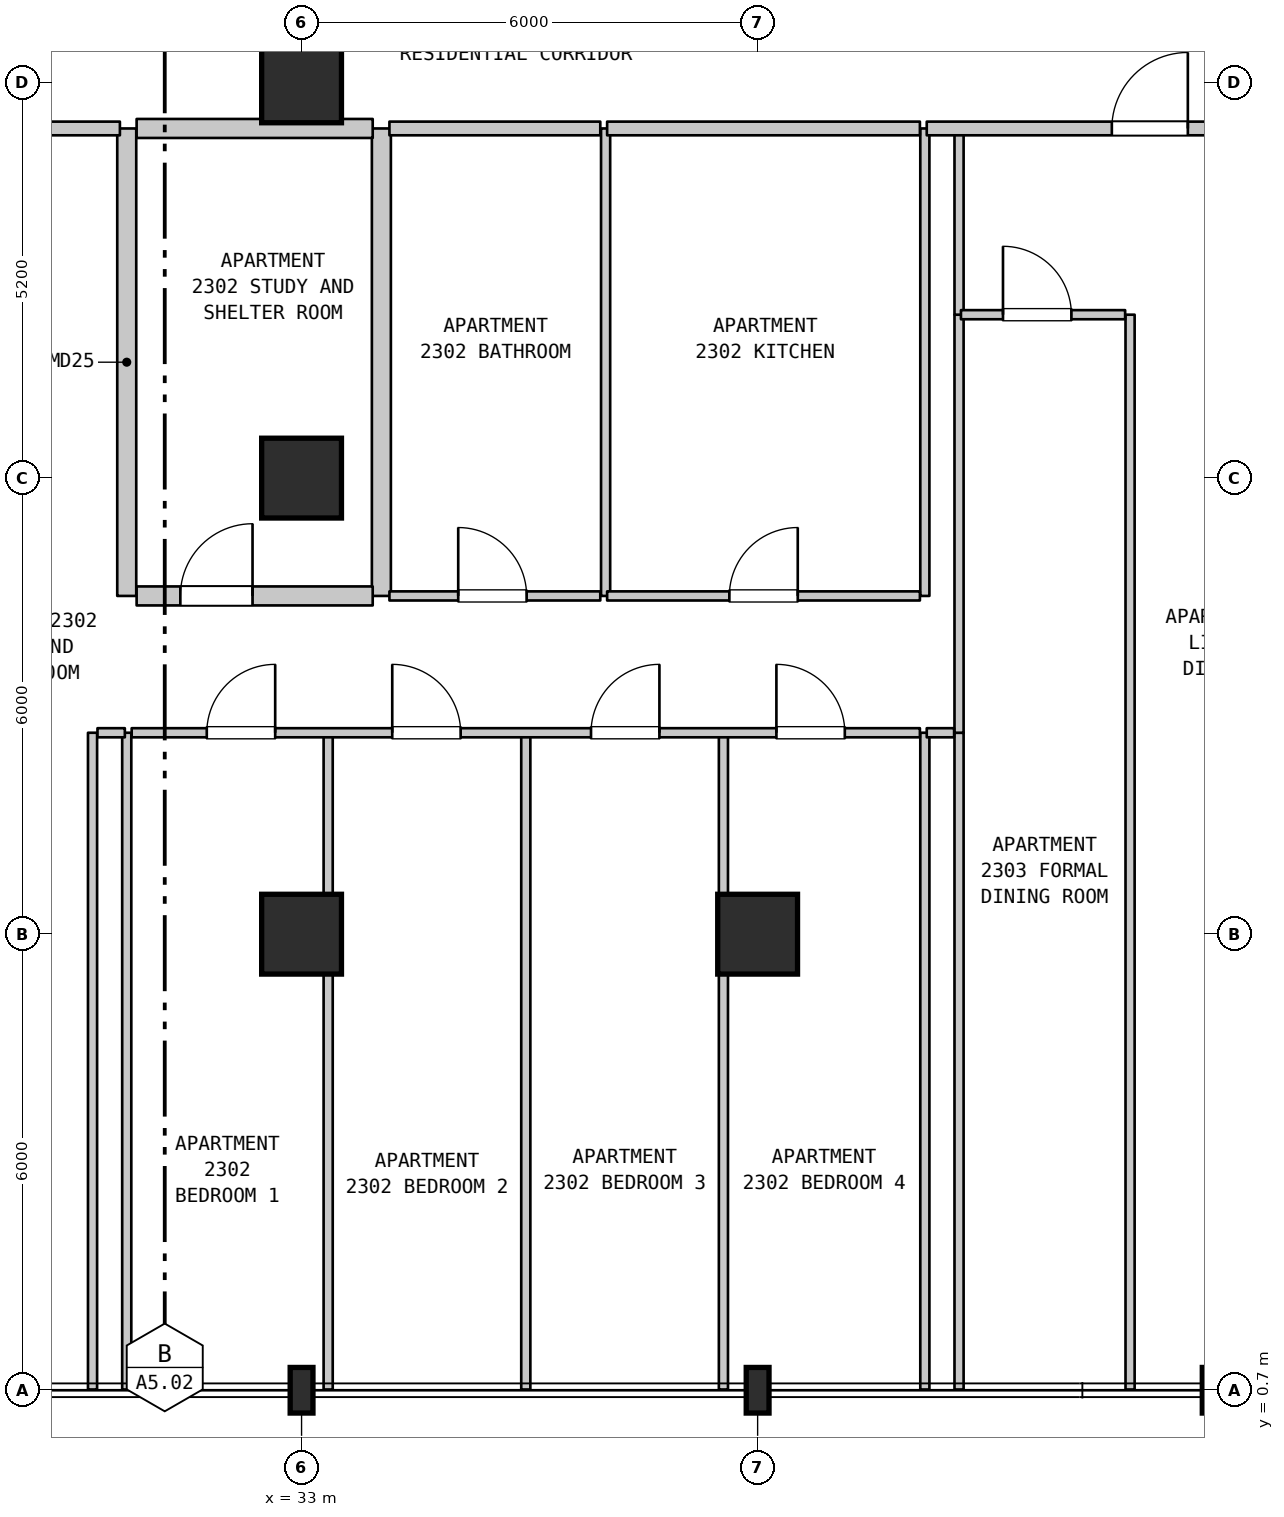
"""IFC4 building model, lengths in metres.
Left out: names, types, materials, properties, quantities, classifications, styles, units other than length and angle.
Written with IfcOpenShell. Run it as: python <this file> out.ifc"""

import sys

from ifc_helpers import new_model, si_unit, direction, frame, frame_2d, origin, origin_2d, place, context, subcontext, project, spatial, rectangle, i_section, extrude, element, fill, save


model = new_model("IFC4")
c1 = context("Model", 3, precision=1e-05, world=origin(), true_north=direction((0.0, 1.0)))
c2 = subcontext(c1, "Body", "Model", "MODEL_VIEW")
j1 = project(units=[si_unit("LENGTHUNIT", "METRE"), si_unit("PLANEANGLEUNIT", "RADIAN")], contexts=[c1])
p1 = place(None, origin())
s1 = spatial("IfcSite", under=j1, at=p1, CompositionType="ELEMENT")
p2 = place(p1, origin())
s2 = spatial("IfcBuilding", under=s1, at=p2, CompositionType="ELEMENT")
p3 = place(p2, frame((0.0, 0.0, 98.3)))
s3 = spatial("IfcBuildingStorey", under=s2, at=p3, CompositionType="ELEMENT", Elevation=98.3)
p4 = place(p3, frame((33.0, 0.7, 0.0), z_axis=(0.0, 0.0, 1.0), x_axis=(1.0, 0.0, 0.0)))
e1 = element("IfcColumn", 1, at=p4, inside=s3, PredefinedType="COLUMN", context=c2, shape_type="SweptSolid", body=[
    extrude(i_section(OverallWidth=0.3, OverallDepth=0.6, WebThickness=0.015, FlangeThickness=0.03, FilletRadius=0.027, at=origin_2d()), origin(), (0.0, 0.0, 1.0), 3.7),
])
for number, where, z_axis, x_axis in (
    (2, (33.0, 6.7, 0.0), (0.0, 0.0, 1.0), (1.0, 0.0, 0.0)),
    (3, (33.0, 12.7, 0.0), (0.0, 0.0, 1.0), (1.0, 0.0, 0.0)),
    (4, (33.0, 17.9, 0.0), (0.0, 0.0, 1.0), (1.0, 0.0, 0.0)),
):
    element("IfcColumn", number, at=place(p3, frame(where, z_axis=z_axis, x_axis=x_axis)), inside=s3, PredefinedType="COLUMN", context=c2, shape_type="SweptSolid", body=[
        extrude(rectangle(XDim=1.05, YDim=1.05, at=origin_2d()), origin(), (0.0, 0.0, 1.0), 3.7),
    ])
p5 = place(p3, frame((39.0, 0.7, 0.0), z_axis=(0.0, 0.0, 1.0), x_axis=(1.0, 0.0, 0.0)))
e5 = element("IfcColumn", 5, at=p5, inside=s3, PredefinedType="COLUMN", context=c2, shape_type="SweptSolid", body=[
    extrude(i_section(OverallWidth=0.3, OverallDepth=0.6, WebThickness=0.015, FlangeThickness=0.03, FilletRadius=0.027, at=origin_2d()), origin(), (0.0, 0.0, 1.0), 3.7),
])
p6 = place(p3, frame((39.0, 6.7, 0.0), z_axis=(0.0, 0.0, 1.0), x_axis=(1.0, 0.0, 0.0)))
e6 = element("IfcColumn", 6, at=p6, inside=s3, PredefinedType="COLUMN", context=c2, shape_type="SweptSolid", body=[
    extrude(rectangle(XDim=1.05, YDim=1.05, at=origin_2d()), origin(), (0.0, 0.0, 1.0), 3.7),
])
p7 = place(p3, frame((45.0, 0.7, 0.0), z_axis=(0.0, 0.0, 1.0), x_axis=(1.0, 0.0, 0.0)))
e7 = element("IfcColumn", 7, at=p7, inside=s3, PredefinedType="COLUMN", context=c2, shape_type="SweptSolid", body=[
    extrude(i_section(OverallWidth=0.3, OverallDepth=0.6, WebThickness=0.015, FlangeThickness=0.03, FilletRadius=0.027, at=origin_2d()), origin(), (0.0, 0.0, 1.0), 3.7),
])
for number, where, z_axis, x_axis in (
    (8, (30.25, 0.71, 0.0), (0.0, 0.0, 1.0), (0.0, 1.0, 0.0)),
    (9, (30.7, 0.71, 0.0), (0.0, 0.0, 1.0), (0.0, 1.0, 0.0)),
):
    element("IfcWall", number, at=place(p3, frame(where, z_axis=z_axis, x_axis=x_axis)), inside=s3, PredefinedType="PARTITIONING", context=c2, shape_type="SweptSolid", body=[
        extrude(rectangle(XDim=8.64, YDim=0.12, at=frame_2d((4.32, 0.0))), origin(), (0.0, 0.0, 1.0), 3.385),
    ])
p8 = place(p3, frame((30.7, 11.15, 0.0), z_axis=(0.0, 0.0, 1.0), x_axis=(0.0, 1.0, 0.0)))
e10 = element("IfcWall", 10, at=p8, inside=s3, PredefinedType="STANDARD", context=c2, shape_type="SweptSolid", body=[
    extrude(rectangle(XDim=6.15, YDim=0.25, at=frame_2d((3.075, 0.0))), origin(), (0.0, 0.0, 1.0), 3.385),
])
p9 = place(p3, frame((33.35, 0.71, 0.0), z_axis=(0.0, 0.0, 1.0), x_axis=(0.0, 1.0, 0.0)))
e11 = element("IfcWall", 11, at=p9, inside=s3, PredefinedType="PARTITIONING", context=c2, shape_type="SweptSolid", body=[
    extrude(rectangle(XDim=8.64, YDim=0.12, at=frame_2d((4.32, 0.0))), origin(), (0.0, 0.0, 1.0), 3.385),
])
p10 = place(p3, frame((34.05, 11.15, 0.0), z_axis=(0.0, 0.0, 1.0), x_axis=(0.0, 1.0, 0.0)))
e12 = element("IfcWall", 12, at=p10, inside=s3, PredefinedType="STANDARD", context=c2, shape_type="SweptSolid", body=[
    extrude(rectangle(XDim=6.15, YDim=0.25, at=frame_2d((3.075, 0.0))), origin(), (0.0, 0.0, 1.0), 3.385),
])
p11 = place(p3, frame((35.95, 0.71, 0.0), z_axis=(0.0, 0.0, 1.0), x_axis=(0.0, 1.0, 0.0)))
e13 = element("IfcWall", 13, at=p11, inside=s3, PredefinedType="PARTITIONING", context=c2, shape_type="SweptSolid", body=[
    extrude(rectangle(XDim=8.64, YDim=0.12, at=frame_2d((4.32, 0.0))), origin(), (0.0, 0.0, 1.0), 3.385),
])
p12 = place(p3, frame((37.0, 11.15, 0.0), z_axis=(0.0, 0.0, 1.0), x_axis=(0.0, 1.0, 0.0)))
e14 = element("IfcWall", 14, at=p12, inside=s3, PredefinedType="PARTITIONING", context=c2, shape_type="SweptSolid", body=[
    extrude(rectangle(XDim=6.15, YDim=0.12, at=frame_2d((3.075, 0.0))), origin(), (0.0, 0.0, 1.0), 3.385),
])
for number, where, z_axis, x_axis in (
    (15, (38.55, 0.71, 0.0), (0.0, 0.0, 1.0), (0.0, 1.0, 0.0)),
    (16, (41.2, 0.71, 0.0), (0.0, 0.0, 1.0), (0.0, 1.0, 0.0)),
):
    element("IfcWall", number, at=place(p3, frame(where, z_axis=z_axis, x_axis=x_axis)), inside=s3, PredefinedType="PARTITIONING", context=c2, shape_type="SweptSolid", body=[
        extrude(rectangle(XDim=8.64, YDim=0.12, at=frame_2d((4.32, 0.0))), origin(), (0.0, 0.0, 1.0), 3.385),
    ])
p13 = place(p3, frame((41.2, 11.15, 0.0), z_axis=(0.0, 0.0, 1.0), x_axis=(0.0, 1.0, 0.0)))
e17 = element("IfcWall", 17, at=p13, inside=s3, PredefinedType="PARTITIONING", context=c2, shape_type="SweptSolid", body=[
    extrude(rectangle(XDim=6.15, YDim=0.12, at=frame_2d((3.075, 0.0))), origin(), (0.0, 0.0, 1.0), 3.385),
])
p14 = place(p3, frame((41.65, 0.71, 0.0), z_axis=(0.0, 0.0, 1.0), x_axis=(0.0, 1.0, 0.0)))
e18 = element("IfcWall", 18, at=p14, inside=s3, PredefinedType="PARTITIONING", context=c2, shape_type="SweptSolid", body=[
    extrude(rectangle(XDim=8.64, YDim=0.12, at=frame_2d((4.32, 0.0))), origin(), (0.0, 0.0, 1.0), 3.385),
])
p15 = place(p3, frame((41.65, 9.35, 0.0), z_axis=(0.0, 0.0, 1.0), x_axis=(0.0, 1.0, 0.0)))
e19 = element("IfcWall", 19, at=p15, inside=s3, PredefinedType="PARTITIONING", context=c2, shape_type="SweptSolid", body=[
    extrude(rectangle(XDim=5.5, YDim=0.12, at=frame_2d((2.75, 0.0))), origin(), (0.0, 0.0, 1.0), 3.385),
])
p16 = place(p3, frame((41.65, 14.85, 0.0), z_axis=(0.0, 0.0, 1.0), x_axis=(0.0, 1.0, 0.0)))
e20 = element("IfcWall", 20, at=p16, inside=s3, PredefinedType="PARTITIONING", context=c2, shape_type="SweptSolid", body=[
    extrude(rectangle(XDim=2.45, YDim=0.12, at=frame_2d((1.225, 0.0))), origin(), (0.0, 0.0, 1.0), 3.385),
])
p17 = place(p3, frame((43.9, 0.71, 0.0), z_axis=(0.0, 0.0, 1.0), x_axis=(0.0, 1.0, 0.0)))
e21 = element("IfcWall", 21, at=p17, inside=s3, PredefinedType="PARTITIONING", context=c2, shape_type="SweptSolid", body=[
    extrude(rectangle(XDim=14.14, YDim=0.12, at=frame_2d((7.07, 0.0))), origin(), (0.0, 0.0, 1.0), 3.385),
])
p18 = place(p3, frame((30.315, 9.35, 0.0), z_axis=(0.0, 0.0, 1.0), x_axis=(1.0, 0.0, 0.0)))
e22 = element("IfcWall", 22, at=p18, inside=s3, PredefinedType="PARTITIONING", context=c2, shape_type="SweptSolid", body=[
    extrude(rectangle(XDim=0.36, YDim=0.12, at=frame_2d((0.18, 0.0))), origin(), (0.0, 0.0, 1.0), 3.385),
])
p19 = place(p3, frame((30.765, 9.35, 0.0), z_axis=(0.0, 0.0, 1.0), x_axis=(1.0, 0.0, 0.0)))
e23 = element("IfcWall", 23, at=p19, inside=s3, PredefinedType="PARTITIONING", context=c2, shape_type="SweptSolid", body=[
    extrude(rectangle(XDim=10.37, YDim=0.12, at=frame_2d((5.185, 0.0))), origin(), (0.0, 0.0, 1.0), 3.385),
])
p20 = place(p19, frame((0.988, 0.0, 0.0)))
e24 = element("IfcOpeningElement", 24, at=p20, cuts=e23, PredefinedType="OPENING", context=c2, shape_type="SweptSolid", body=[
    extrude(rectangle(XDim=0.9, YDim=2.15, at=frame_2d((0.45, 1.075))), frame((0.0, 0.07, 0.0), z_axis=(0.0, -1.0, 0.0), x_axis=(1.0, 0.0, 0.0)), (0.0, 0.0, 1.0), 0.14),
])
p21 = place(p19, frame((3.428, 0.0, 0.0)))
e25 = element("IfcOpeningElement", 25, at=p21, cuts=e23, PredefinedType="OPENING", context=c2, shape_type="SweptSolid", body=[
    extrude(rectangle(XDim=0.9, YDim=2.15, at=frame_2d((0.45, 1.075))), frame((0.0, 0.07, 0.0), z_axis=(0.0, -1.0, 0.0), x_axis=(1.0, 0.0, 0.0)), (0.0, 0.0, 1.0), 0.14),
])
p22 = place(p19, frame((6.043, 0.0, 0.0)))
e26 = element("IfcOpeningElement", 26, at=p22, cuts=e23, PredefinedType="OPENING", context=c2, shape_type="SweptSolid", body=[
    extrude(rectangle(XDim=0.9, YDim=2.15, at=frame_2d((0.45, 1.075))), frame((0.0, 0.07, 0.0), z_axis=(0.0, -1.0, 0.0), x_axis=(1.0, 0.0, 0.0)), (0.0, 0.0, 1.0), 0.14),
])
p23 = place(p19, frame((8.482, 0.0, 0.0)))
e27 = element("IfcOpeningElement", 27, at=p23, cuts=e23, PredefinedType="OPENING", context=c2, shape_type="SweptSolid", body=[
    extrude(rectangle(XDim=0.9, YDim=2.15, at=frame_2d((0.45, 1.075))), frame((0.0, 0.07, 0.0), z_axis=(0.0, -1.0, 0.0), x_axis=(1.0, 0.0, 0.0)), (0.0, 0.0, 1.0), 0.14),
])
p24 = place(p3, frame((41.225, 9.35, 0.0), z_axis=(0.0, 0.0, 1.0), x_axis=(1.0, 0.0, 0.0)))
e28 = element("IfcWall", 28, at=p24, inside=s3, PredefinedType="PARTITIONING", context=c2, shape_type="SweptSolid", body=[
    extrude(rectangle(XDim=0.36, YDim=0.12, at=frame_2d((0.18, 0.0))), origin(), (0.0, 0.0, 1.0), 3.385),
])
p25 = place(p3, frame((30.83, 11.15, 0.0), z_axis=(0.0, 0.0, 1.0), x_axis=(1.0, 0.0, 0.0)))
e29 = element("IfcWall", 29, at=p25, inside=s3, PredefinedType="STANDARD", context=c2, shape_type="SweptSolid", body=[
    extrude(rectangle(XDim=3.106, YDim=0.25, at=frame_2d((1.553, 0.0))), origin(), (0.0, 0.0, 1.0), 3.385),
])
p26 = place(p25, frame((0.575, 0.0, 0.0)))
e30 = element("IfcOpeningElement", 30, at=p26, cuts=e29, PredefinedType="OPENING", context=c2, shape_type="SweptSolid", body=[
    extrude(rectangle(XDim=0.95, YDim=2.15, at=frame_2d((0.475, 1.075))), frame((0.0, 0.135, 0.0), z_axis=(0.0, -1.0, 0.0), x_axis=(1.0, 0.0, 0.0)), (0.0, 0.0, 1.0), 0.27),
])
p27 = place(p3, frame((34.156, 11.15, 0.0), z_axis=(0.0, 0.0, 1.0), x_axis=(1.0, 0.0, 0.0)))
e31 = element("IfcWall", 31, at=p27, inside=s3, PredefinedType="PARTITIONING", context=c2, shape_type="SweptSolid", body=[
    extrude(rectangle(XDim=2.774, YDim=0.12, at=frame_2d((1.387, 0.0))), origin(), (0.0, 0.0, 1.0), 3.385),
])
p28 = place(p27, frame((0.905, 0.0, 0.0)))
e32 = element("IfcOpeningElement", 32, at=p28, cuts=e31, PredefinedType="OPENING", context=c2, shape_type="SweptSolid", body=[
    extrude(rectangle(XDim=0.9, YDim=2.1, at=frame_2d((0.45, 1.05))), frame((0.0, 0.07, 0.0), z_axis=(0.0, -1.0, 0.0), x_axis=(1.0, 0.0, 0.0)), (0.0, 0.0, 1.0), 0.14),
])
p29 = place(p3, frame((37.02, 11.15, 0.0), z_axis=(0.0, 0.0, 1.0), x_axis=(1.0, 0.0, 0.0)))
e33 = element("IfcWall", 33, at=p29, inside=s3, PredefinedType="PARTITIONING", context=c2, shape_type="SweptSolid", body=[
    extrude(rectangle(XDim=4.115, YDim=0.12, at=frame_2d((2.058, 0.0))), origin(), (0.0, 0.0, 1.0), 3.385),
])
p30 = place(p29, frame((1.608, 0.0, 0.0)))
e34 = element("IfcOpeningElement", 34, at=p30, cuts=e33, PredefinedType="OPENING", context=c2, shape_type="SweptSolid", body=[
    extrude(rectangle(XDim=0.9, YDim=2.15, at=frame_2d((0.45, 1.075))), frame((0.0, 0.07, 0.0), z_axis=(0.0, -1.0, 0.0), x_axis=(1.0, 0.0, 0.0)), (0.0, 0.0, 1.0), 0.14),
])
p31 = place(p3, frame((41.675, 14.85, 0.0), z_axis=(0.0, 0.0, 1.0), x_axis=(1.0, 0.0, 0.0)))
e35 = element("IfcWall", 35, at=p31, inside=s3, PredefinedType="PARTITIONING", context=c2, shape_type="SweptSolid", body=[
    extrude(rectangle(XDim=2.16, YDim=0.12, at=frame_2d((1.08, 0.0))), origin(), (0.0, 0.0, 1.0), 3.385),
])
p32 = place(p31, frame((0.553, 0.0, 0.0)))
e36 = element("IfcOpeningElement", 36, at=p32, cuts=e35, PredefinedType="OPENING", context=c2, shape_type="SweptSolid", body=[
    extrude(rectangle(XDim=0.9, YDim=2.15, at=frame_2d((0.45, 1.075))), frame((0.0, 0.07, 0.0), z_axis=(0.0, -1.0, 0.0), x_axis=(1.0, 0.0, 0.0)), (0.0, 0.0, 1.0), 0.14),
])
p33 = place(p3, frame((25.515, 17.3, 0.0), z_axis=(0.0, 0.0, 1.0), x_axis=(1.0, 0.0, 0.0)))
e37 = element("IfcWall", 37, at=p33, inside=s3, PredefinedType="STANDARD", context=c2, shape_type="SweptSolid", body=[
    extrude(rectangle(XDim=5.095, YDim=0.18, at=frame_2d((2.548, 0.0))), origin(), (0.0, 0.0, 1.0), 3.385),
])
p34 = place(p33, frame((2.08, 0.0, 0.0)))
e38 = element("IfcOpeningElement", 38, at=p34, cuts=e37, PredefinedType="OPENING", context=c2, shape_type="SweptSolid", body=[
    extrude(rectangle(XDim=1.0, YDim=2.15, at=frame_2d((0.5, 1.075))), frame((0.0, 0.1, 0.0), z_axis=(0.0, -1.0, 0.0), x_axis=(1.0, 0.0, 0.0)), (0.0, 0.0, 1.0), 0.2),
])
p35 = place(p3, frame((30.83, 17.3, 0.0), z_axis=(0.0, 0.0, 1.0), x_axis=(1.0, 0.0, 0.0)))
e39 = element("IfcWall", 39, at=p35, inside=s3, PredefinedType="STANDARD", context=c2, shape_type="SweptSolid", body=[
    extrude(rectangle(XDim=3.106, YDim=0.25, at=frame_2d((1.553, 0.0))), origin(), (0.0, 0.0, 1.0), 3.385),
])
p36 = place(p3, frame((34.156, 17.3, 0.0), z_axis=(0.0, 0.0, 1.0), x_axis=(1.0, 0.0, 0.0)))
e40 = element("IfcWall", 40, at=p36, inside=s3, PredefinedType="STANDARD", context=c2, shape_type="SweptSolid", body=[
    extrude(rectangle(XDim=2.774, YDim=0.18, at=frame_2d((1.387, 0.0))), origin(), (0.0, 0.0, 1.0), 3.385),
])
p37 = place(p3, frame((37.02, 17.3, 0.0), z_axis=(0.0, 0.0, 1.0), x_axis=(1.0, 0.0, 0.0)))
e41 = element("IfcWall", 41, at=p37, inside=s3, PredefinedType="STANDARD", context=c2, shape_type="SweptSolid", body=[
    extrude(rectangle(XDim=4.115, YDim=0.18, at=frame_2d((2.058, 0.0))), origin(), (0.0, 0.0, 1.0), 3.385),
])
p38 = place(p3, frame((41.225, 17.3, 0.0), z_axis=(0.0, 0.0, 1.0), x_axis=(1.0, 0.0, 0.0)))
e42 = element("IfcWall", 42, at=p38, inside=s3, PredefinedType="STANDARD", context=c2, shape_type="SweptSolid", body=[
    extrude(rectangle(XDim=5.545, YDim=0.18, at=frame_2d((2.772, 0.0))), origin(), (0.0, 0.0, 1.0), 3.385),
])
p39 = place(p38, frame((2.435, 0.0, 0.0)))
e43 = element("IfcOpeningElement", 43, at=p39, cuts=e42, PredefinedType="OPENING", context=c2, shape_type="SweptSolid", body=[
    extrude(rectangle(XDim=1.0, YDim=2.15, at=frame_2d((0.5, 1.075))), frame((0.0, 0.1, 0.0), z_axis=(0.0, -1.0, 0.0), x_axis=(1.0, 0.0, 0.0)), (0.0, 0.0, 1.0), 0.2),
])
p40 = place(p20, origin())
e44 = element("IfcDoor", 44, at=p40, inside=s3, OperationType="SINGLE_SWING_RIGHT", PredefinedType="DOOR", context=c2, shape_type="SweptSolid", body=[
    extrude(rectangle(XDim=0.9, YDim=2.15, at=frame_2d((0.45, 1.075))), frame((0.0, 0.025, 0.0), z_axis=(0.0, -1.0, 0.0), x_axis=(1.0, 0.0, 0.0)), (0.0, 0.0, 1.0), 0.05),
])
fill(e24, e44)
p41 = place(p21, origin())
e45 = element("IfcDoor", 45, at=p41, inside=s3, OperationType="SINGLE_SWING_LEFT", PredefinedType="DOOR", context=c2, shape_type="SweptSolid", body=[
    extrude(rectangle(XDim=0.9, YDim=2.15, at=frame_2d((0.45, 1.075))), frame((0.0, 0.025, 0.0), z_axis=(0.0, -1.0, 0.0), x_axis=(1.0, 0.0, 0.0)), (0.0, 0.0, 1.0), 0.05),
])
fill(e25, e45)
p42 = place(p22, origin())
e46 = element("IfcDoor", 46, at=p42, inside=s3, OperationType="SINGLE_SWING_RIGHT", PredefinedType="DOOR", context=c2, shape_type="SweptSolid", body=[
    extrude(rectangle(XDim=0.9, YDim=2.15, at=frame_2d((0.45, 1.075))), frame((0.0, 0.025, 0.0), z_axis=(0.0, -1.0, 0.0), x_axis=(1.0, 0.0, 0.0)), (0.0, 0.0, 1.0), 0.05),
])
fill(e26, e46)
p43 = place(p23, origin())
e47 = element("IfcDoor", 47, at=p43, inside=s3, OperationType="SINGLE_SWING_LEFT", PredefinedType="DOOR", context=c2, shape_type="SweptSolid", body=[
    extrude(rectangle(XDim=0.9, YDim=2.15, at=frame_2d((0.45, 1.075))), frame((0.0, 0.025, 0.0), z_axis=(0.0, -1.0, 0.0), x_axis=(1.0, 0.0, 0.0)), (0.0, 0.0, 1.0), 0.05),
])
fill(e27, e47)
p44 = place(p26, origin())
e48 = element("IfcDoor", 48, at=p44, inside=s3, OperationType="SINGLE_SWING_RIGHT", PredefinedType="DOOR", context=c2, shape_type="SweptSolid", body=[
    extrude(rectangle(XDim=0.95, YDim=2.15, at=frame_2d((0.475, 1.075))), frame((0.0, 0.025, 0.0), z_axis=(0.0, -1.0, 0.0), x_axis=(1.0, 0.0, 0.0)), (0.0, 0.0, 1.0), 0.05),
])
fill(e30, e48)
p45 = place(p28, origin())
e49 = element("IfcDoor", 49, at=p45, inside=s3, OperationType="SINGLE_SWING_LEFT", PredefinedType="DOOR", context=c2, shape_type="SweptSolid", body=[
    extrude(rectangle(XDim=0.9, YDim=2.1, at=frame_2d((0.45, 1.05))), frame((0.0, 0.025, 0.0), z_axis=(0.0, -1.0, 0.0), x_axis=(1.0, 0.0, 0.0)), (0.0, 0.0, 1.0), 0.05),
])
fill(e32, e49)
p46 = place(p30, origin())
e50 = element("IfcDoor", 50, at=p46, inside=s3, OperationType="SINGLE_SWING_RIGHT", PredefinedType="DOOR", context=c2, shape_type="SweptSolid", body=[
    extrude(rectangle(XDim=0.9, YDim=2.15, at=frame_2d((0.45, 1.075))), frame((0.0, 0.025, 0.0), z_axis=(0.0, -1.0, 0.0), x_axis=(1.0, 0.0, 0.0)), (0.0, 0.0, 1.0), 0.05),
])
fill(e34, e50)
p47 = place(p32, origin())
e51 = element("IfcDoor", 51, at=p47, inside=s3, OperationType="SINGLE_SWING_LEFT", PredefinedType="DOOR", context=c2, shape_type="SweptSolid", body=[
    extrude(rectangle(XDim=0.9, YDim=2.15, at=frame_2d((0.45, 1.075))), frame((0.0, 0.025, 0.0), z_axis=(0.0, -1.0, 0.0), x_axis=(1.0, 0.0, 0.0)), (0.0, 0.0, 1.0), 0.05),
])
fill(e36, e51)
p48 = place(p39, origin())
e52 = element("IfcDoor", 52, at=p48, inside=s3, OperationType="SINGLE_SWING_RIGHT", PredefinedType="DOOR", context=c2, shape_type="SweptSolid", body=[
    extrude(rectangle(XDim=1.0, YDim=2.15, at=frame_2d((0.5, 1.075))), frame((0.0, 0.025, 0.0), z_axis=(0.0, -1.0, 0.0), x_axis=(1.0, 0.0, 0.0)), (0.0, 0.0, 1.0), 0.05),
])
fill(e43, e52)
save(model, sys.argv[1])
